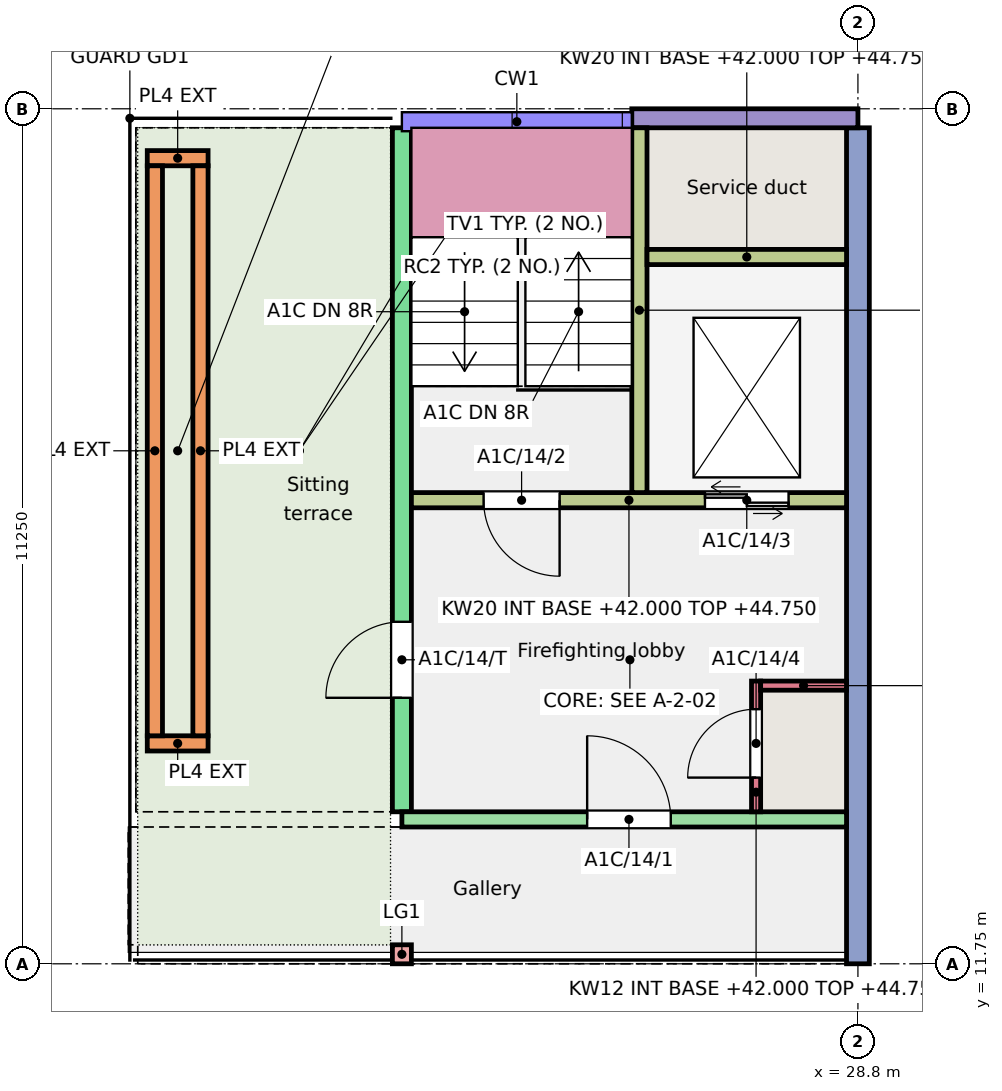
"""IFC4 building model, lengths in metres.
Left out: names, types, materials, properties, quantities, classifications, styles, units other than length and angle.
Written with IfcOpenShell. Run it as: python <this file> out.ifc"""

import sys

from ifc_helpers import new_model, si_unit, direction, frame, frame_2d, origin, origin_2d, place, context, subcontext, project, spatial, rectangle, extrude, element, fill, save


model = new_model("IFC4")
c1 = context("Model", 3, precision=1e-05, world=origin(), true_north=direction((0.0, 1.0)))
c2 = subcontext(c1, "Body", "Model", "MODEL_VIEW")
j1 = project(units=[si_unit("LENGTHUNIT", "METRE"), si_unit("PLANEANGLEUNIT", "RADIAN")], contexts=[c1])
p1 = place(None, origin())
s1 = spatial("IfcSite", under=j1, at=p1, CompositionType="ELEMENT")
p2 = place(p1, origin())
s2 = spatial("IfcBuilding", under=s1, at=p2, CompositionType="ELEMENT")
p3 = place(p2, frame((0.0, 0.0, 42.0)))
s3 = spatial("IfcBuildingStorey", under=s2, at=p3, CompositionType="ELEMENT", Elevation=42.0)
p4 = place(p3, frame((22.8, 13.75, 0.0), z_axis=(0.0, 0.0, 1.0), x_axis=(0.0, 1.0, 0.0)))
e1 = element("IfcWall", 1, at=p4, inside=s3, PredefinedType="SHEAR", context=c2, shape_type="SweptSolid", body=[
    extrude(rectangle(XDim=9.0, YDim=0.25, at=frame_2d((4.5, 0.0))), origin(), (0.0, 0.0, 1.0), 3.0),
])
p5 = place(p4, frame((1.5, 0.0, 0.0)))
e2 = element("IfcOpeningElement", 2, at=p5, cuts=e1, PredefinedType="OPENING", context=c2, shape_type="SweptSolid", body=[
    extrude(rectangle(XDim=1.0, YDim=2.1, at=frame_2d((0.5, 1.05))), frame((0.0, 0.135, 0.0), z_axis=(0.0, -1.0, 0.0), x_axis=(1.0, 0.0, 0.0)), (0.0, 0.0, 1.0), 0.27),
])
p6 = place(p3, frame((28.8, 11.75, 0.0), z_axis=(0.0, 0.0, 1.0), x_axis=(0.0, 1.0, 0.0)))
e3 = element("IfcWall", 3, at=p6, inside=s3, PredefinedType="SHEAR", context=c2, shape_type="SweptSolid", body=[
    extrude(rectangle(XDim=11.0, YDim=0.3, at=frame_2d((5.5, 0.0))), origin(), (0.0, 0.0, 1.0), 3.0),
])
p7 = place(p3, frame((25.825, 22.875, 0.0), z_axis=(0.0, 0.0, 1.0), x_axis=(1.0, 0.0, 0.0)))
e4 = element("IfcWall", 4, at=p7, inside=s3, PredefinedType="SOLIDWALL", context=c2, shape_type="SweptSolid", body=[
    extrude(rectangle(XDim=2.975, YDim=0.25, at=frame_2d((1.488, 0.0))), origin(), (0.0, 0.0, 1.0), 3.0),
])
p8 = place(p3, frame((22.8, 13.65, 0.0), z_axis=(0.0, 0.0, 1.0), x_axis=(1.0, 0.0, 0.0)))
e5 = element("IfcWall", 5, at=p8, inside=s3, PredefinedType="SHEAR", context=c2, shape_type="SweptSolid", body=[
    extrude(rectangle(XDim=5.85, YDim=0.2, at=frame_2d((2.925, 0.0))), origin(), (0.0, 0.0, 1.0), 2.75),
])
p9 = place(p8, frame((2.438, 0.0, 0.0)))
e6 = element("IfcOpeningElement", 6, at=p9, cuts=e5, PredefinedType="OPENING", context=c2, shape_type="SweptSolid", body=[
    extrude(rectangle(XDim=1.1, YDim=2.1, at=frame_2d((0.55, 1.05))), frame((0.0, 0.11, 0.0), z_axis=(0.0, -1.0, 0.0), x_axis=(1.0, 0.0, 0.0)), (0.0, 0.0, 1.0), 0.22),
])
p10 = place(p3, frame((22.925, 17.85, 0.0), z_axis=(0.0, 0.0, 1.0), x_axis=(1.0, 0.0, 0.0)))
e7 = element("IfcWall", 7, at=p10, inside=s3, PredefinedType="SHEAR", context=c2, shape_type="SweptSolid", body=[
    extrude(rectangle(XDim=5.725, YDim=0.2, at=frame_2d((2.862, 0.0))), origin(), (0.0, 0.0, 1.0), 2.75),
])
p11 = place(p10, frame((0.95, 0.0, 0.0)))
e8 = element("IfcOpeningElement", 8, at=p11, cuts=e7, PredefinedType="OPENING", context=c2, shape_type="SweptSolid", body=[
    extrude(rectangle(XDim=1.0, YDim=2.1, at=frame_2d((0.5, 1.05))), frame((0.0, 0.11, 0.0), z_axis=(0.0, -1.0, 0.0), x_axis=(1.0, 0.0, 0.0)), (0.0, 0.0, 1.0), 0.22),
])
p12 = place(p10, frame((3.863, 0.0, 0.0)))
e9 = element("IfcOpeningElement", 9, at=p12, cuts=e7, PredefinedType="OPENING", context=c2, shape_type="SweptSolid", body=[
    extrude(rectangle(XDim=1.1, YDim=2.1, at=frame_2d((0.55, 1.05))), frame((0.0, 0.11, 0.0), z_axis=(0.0, -1.0, 0.0), x_axis=(1.0, 0.0, 0.0)), (0.0, 0.0, 1.0), 0.22),
])
p13 = place(p3, frame((25.925, 17.95, 0.0), z_axis=(0.0, 0.0, 1.0), x_axis=(0.0, 1.0, 0.0)))
e10 = element("IfcWall", 10, at=p13, inside=s3, PredefinedType="SHEAR", context=c2, shape_type="SweptSolid", body=[
    extrude(rectangle(XDim=4.8, YDim=0.2, at=frame_2d((2.4, 0.0))), origin(), (0.0, 0.0, 1.0), 2.75),
])
p14 = place(p3, frame((26.025, 21.05, 0.0), z_axis=(0.0, 0.0, 1.0), x_axis=(1.0, 0.0, 0.0)))
e11 = element("IfcWall", 11, at=p14, inside=s3, PredefinedType="SHEAR", context=c2, shape_type="SweptSolid", body=[
    extrude(rectangle(XDim=2.625, YDim=0.2, at=frame_2d((1.312, 0.0))), origin(), (0.0, 0.0, 1.0), 2.75),
])
p15 = place(p3, frame((27.46, 13.75, 0.0), z_axis=(0.0, 0.0, 1.0), x_axis=(0.0, 1.0, 0.0)))
e12 = element("IfcWall", 12, at=p15, inside=s3, PredefinedType="SHEAR", context=c2, shape_type="SweptSolid", body=[
    extrude(rectangle(XDim=1.72, YDim=0.12, at=frame_2d((0.86, 0.0))), origin(), (0.0, 0.0, 1.0), 2.75),
])
p16 = place(p15, frame((0.45, 0.0, 0.0)))
e13 = element("IfcOpeningElement", 13, at=p16, cuts=e12, PredefinedType="OPENING", context=c2, shape_type="SweptSolid", body=[
    extrude(rectangle(XDim=0.9, YDim=2.1, at=frame_2d((0.45, 1.05))), frame((0.0, 0.07, 0.0), z_axis=(0.0, -1.0, 0.0), x_axis=(1.0, 0.0, 0.0)), (0.0, 0.0, 1.0), 0.14),
])
p17 = place(p3, frame((27.52, 15.41, 0.0), z_axis=(0.0, 0.0, 1.0), x_axis=(1.0, 0.0, 0.0)))
e14 = element("IfcWall", 14, at=p17, inside=s3, PredefinedType="SHEAR", context=c2, shape_type="SweptSolid", body=[
    extrude(rectangle(XDim=1.13, YDim=0.12, at=frame_2d((0.565, 0.0))), origin(), (0.0, 0.0, 1.0), 2.75),
])
p18 = place(p3, frame((22.8, 11.875, 0.0), z_axis=(0.0, 0.0, 1.0), x_axis=(1.0, 0.0, 0.0)))
e15 = element("IfcColumn", 15, at=p18, inside=s3, PredefinedType="COLUMN", context=c2, shape_type="SweptSolid", body=[
    extrude(rectangle(XDim=0.25, YDim=0.25, at=origin_2d()), origin(), (0.0, 0.0, 1.0), 3.0),
])
for number, where, z_axis, x_axis in (
    (16, (19.45, 14.65, 0.01), (0.0, 0.0, 1.0), (1.0, 0.0, 0.0)),
    (17, (19.45, 22.35, 0.01), (0.0, 0.0, 1.0), (1.0, 0.0, 0.0)),
):
    element("IfcWall", number, at=place(p3, frame(where, z_axis=z_axis, x_axis=x_axis)), inside=s3, PredefinedType="SOLIDWALL", context=c2, shape_type="SweptSolid", body=[
        extrude(rectangle(XDim=0.8, YDim=0.2, at=frame_2d((0.4, 0.0))), origin(), (0.0, 0.0, 1.0), 0.45),
    ])
for number, where, z_axis, x_axis in (
    (18, (19.55, 14.75, 0.01), (0.0, 0.0, 1.0), (0.0, 1.0, 0.0)),
    (19, (20.15, 14.75, 0.01), (0.0, 0.0, 1.0), (0.0, 1.0, 0.0)),
):
    element("IfcWall", number, at=place(p3, frame(where, z_axis=z_axis, x_axis=x_axis)), inside=s3, PredefinedType="SOLIDWALL", context=c2, shape_type="SweptSolid", body=[
        extrude(rectangle(XDim=7.5, YDim=0.2, at=frame_2d((3.75, 0.0))), origin(), (0.0, 0.0, 1.0), 0.45),
    ])
p19 = place(p9, origin())
e20 = element("IfcDoor", 20, at=p19, inside=s3, OperationType="SINGLE_SWING_LEFT", PredefinedType="DOOR", context=c2, shape_type="SweptSolid", body=[
    extrude(rectangle(XDim=1.1, YDim=2.1, at=frame_2d((0.55, 1.05))), frame((0.0, 0.025, 0.0), z_axis=(0.0, -1.0, 0.0), x_axis=(1.0, 0.0, 0.0)), (0.0, 0.0, 1.0), 0.05),
])
fill(e6, e20)
p20 = place(p11, origin())
e21 = element("IfcDoor", 21, at=p20, inside=s3, OperationType="SINGLE_SWING_RIGHT", PredefinedType="DOOR", context=c2, shape_type="SweptSolid", body=[
    extrude(rectangle(XDim=1.0, YDim=2.1, at=frame_2d((0.5, 1.05))), frame((0.0, 0.025, 0.0), z_axis=(0.0, -1.0, 0.0), x_axis=(1.0, 0.0, 0.0)), (0.0, 0.0, 1.0), 0.05),
])
fill(e8, e21)
p21 = place(p12, origin())
e22 = element("IfcDoor", 22, at=p21, inside=s3, OperationType="DOUBLE_DOOR_SLIDING", PredefinedType="DOOR", context=c2, shape_type="SweptSolid", body=[
    extrude(rectangle(XDim=1.1, YDim=2.1, at=frame_2d((0.55, 1.05))), frame((0.0, 0.025, 0.0), z_axis=(0.0, -1.0, 0.0), x_axis=(1.0, 0.0, 0.0)), (0.0, 0.0, 1.0), 0.05),
])
fill(e9, e22)
p22 = place(p16, origin())
e23 = element("IfcDoor", 23, at=p22, inside=s3, OperationType="SINGLE_SWING_LEFT", PredefinedType="DOOR", context=c2, shape_type="SweptSolid", body=[
    extrude(rectangle(XDim=0.9, YDim=2.1, at=frame_2d((0.45, 1.05))), frame((0.0, 0.025, 0.0), z_axis=(0.0, -1.0, 0.0), x_axis=(1.0, 0.0, 0.0)), (0.0, 0.0, 1.0), 0.05),
])
fill(e13, e23)
p23 = place(p5, origin())
e24 = element("IfcDoor", 24, at=p23, inside=s3, OperationType="SINGLE_SWING_LEFT", PredefinedType="DOOR", context=c2, shape_type="SweptSolid", body=[
    extrude(rectangle(XDim=1.0, YDim=2.1, at=frame_2d((0.5, 1.05))), frame((0.0, 0.025, 0.0), z_axis=(0.0, -1.0, 0.0), x_axis=(1.0, 0.0, 0.0)), (0.0, 0.0, 1.0), 0.05),
])
fill(e2, e24)
save(model, sys.argv[1])
